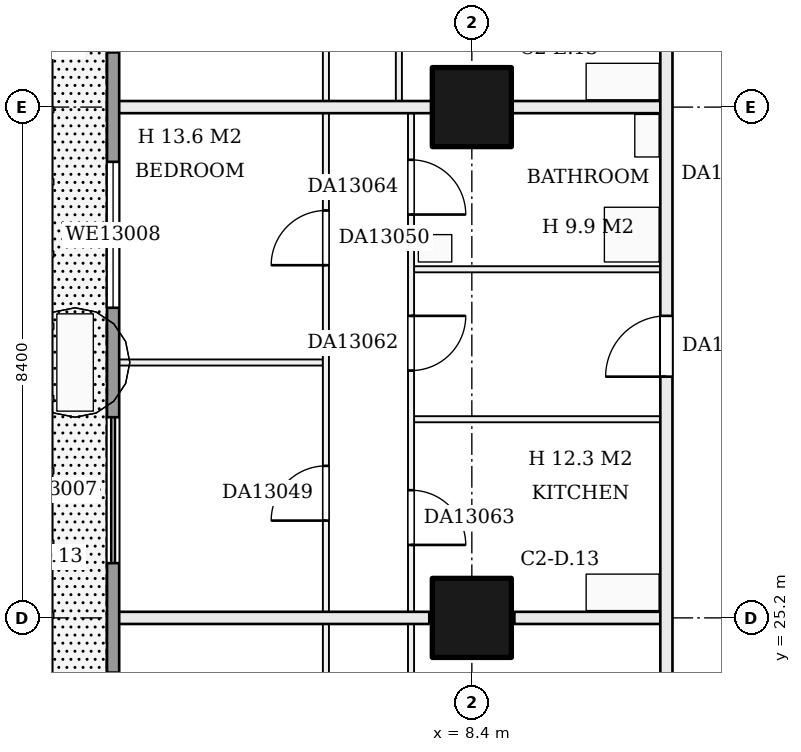
"""IFC4 building model, lengths in metres.
Left out: names, types, materials, properties, quantities, classifications, styles, units other than length and angle.
Written with IfcOpenShell. Run it as: python <this file> out.ifc"""

import sys

from ifc_helpers import new_model, si_unit, direction, frame, frame_2d, origin, origin_2d, place, context, subcontext, project, spatial, rectangle, extrude, element, fill, save


model = new_model("IFC4")
c1 = context("Model", 3, precision=1e-05, world=origin(), true_north=direction((0.0, 1.0)))
c2 = subcontext(c1, "Body", "Model", "MODEL_VIEW")
j1 = project(units=[si_unit("LENGTHUNIT", "METRE"), si_unit("PLANEANGLEUNIT", "RADIAN")], contexts=[c1])
p1 = place(None, origin())
s1 = spatial("IfcSite", under=j1, at=p1, CompositionType="ELEMENT")
p2 = place(p1, origin())
s2 = spatial("IfcBuilding", under=s1, at=p2, CompositionType="ELEMENT")
p3 = place(p2, frame((0.0, 0.0, 56.7)))
s3 = spatial("IfcBuildingStorey", under=s2, at=p3, CompositionType="ELEMENT", Elevation=56.7)
for number, where, z_axis, x_axis in (
    (1, (8.4, 25.2, 0.0), (0.0, 0.0, 1.0), (1.0, 0.0, 0.0)),
    (2, (8.4, 33.6, 0.0), (0.0, 0.0, 1.0), (1.0, 0.0, 0.0)),
):
    element("IfcColumn", number, at=place(p3, frame(where, z_axis=z_axis, x_axis=x_axis)), inside=s3, PredefinedType="COLUMN", context=c2, shape_type="SweptSolid", body=[
        extrude(rectangle(XDim=1.3, YDim=1.3, at=origin_2d()), origin(), (0.0, 0.0, 1.0), 3.22),
    ])
p4 = place(p3, frame((2.5, 25.2, 0.0), z_axis=(0.0, 0.0, 1.0), x_axis=(1.0, 0.0, 0.0)))
e3 = element("IfcWall", 3, at=p4, inside=s3, PredefinedType="PARTITIONING", context=c2, shape_type="SweptSolid", body=[
    extrude(rectangle(XDim=5.2, YDim=0.2, at=frame_2d((2.6, 0.0))), origin(), (0.0, 0.0, 1.0), 3.22),
])
p5 = place(p3, frame((9.1, 25.2, 0.0), z_axis=(0.0, 0.0, 1.0), x_axis=(1.0, 0.0, 0.0)))
e4 = element("IfcWall", 4, at=p5, inside=s3, PredefinedType="PARTITIONING", context=c2, shape_type="SweptSolid", body=[
    extrude(rectangle(XDim=2.4, YDim=0.2, at=frame_2d((1.2, 0.0))), origin(), (0.0, 0.0, 1.0), 3.22),
])
p6 = place(p3, frame((7.45, 28.467, 0.0), z_axis=(0.0, 0.0, 1.0), x_axis=(1.0, 0.0, 0.0)))
e5 = element("IfcWall", 5, at=p6, inside=s3, PredefinedType="PARTITIONING", context=c2, shape_type="SweptSolid", body=[
    extrude(rectangle(XDim=4.05, YDim=0.1, at=frame_2d((2.025, 0.0))), origin(), (0.0, 0.0, 1.0), 3.22),
])
p7 = place(p3, frame((2.5, 29.4, 0.0), z_axis=(0.0, 0.0, 1.0), x_axis=(1.0, 0.0, 0.0)))
e6 = element("IfcWall", 6, at=p7, inside=s3, PredefinedType="PARTITIONING", context=c2, shape_type="SweptSolid", body=[
    extrude(rectangle(XDim=3.45, YDim=0.1, at=frame_2d((1.725, 0.0))), origin(), (0.0, 0.0, 1.0), 3.22),
])
p8 = place(p3, frame((7.45, 30.933, 0.0), z_axis=(0.0, 0.0, 1.0), x_axis=(1.0, 0.0, 0.0)))
e7 = element("IfcWall", 7, at=p8, inside=s3, PredefinedType="PARTITIONING", context=c2, shape_type="SweptSolid", body=[
    extrude(rectangle(XDim=4.05, YDim=0.1, at=frame_2d((2.025, 0.0))), origin(), (0.0, 0.0, 1.0), 3.22),
])
p9 = place(p3, frame((2.5, 33.6, 0.0), z_axis=(0.0, 0.0, 1.0), x_axis=(1.0, 0.0, 0.0)))
e8 = element("IfcWall", 8, at=p9, inside=s3, PredefinedType="PARTITIONING", context=c2, shape_type="SweptSolid", body=[
    extrude(rectangle(XDim=9.0, YDim=0.2, at=frame_2d((4.5, 0.0))), origin(), (0.0, 0.0, 1.0), 3.22),
])
p10 = place(p3, frame((6.0, 12.7, 0.0), z_axis=(0.0, 0.0, 1.0), x_axis=(0.0, 1.0, 0.0)))
e9 = element("IfcWall", 9, at=p10, inside=s3, PredefinedType="PARTITIONING", context=c2, shape_type="SweptSolid", body=[
    extrude(rectangle(XDim=29.2, YDim=0.1, at=frame_2d((14.6, 0.0))), origin(), (0.0, 0.0, 1.0), 3.22),
])
p11 = place(p10, frame((3.7, 0.0, 0.0)))
e10 = element("IfcOpeningElement", 10, at=p11, cuts=e9, PredefinedType="OPENING", context=c2, shape_type="SweptSolid", body=[
    extrude(rectangle(XDim=0.9, YDim=2.1, at=frame_2d((0.45, 1.05))), frame((0.0, 0.06, 0.0), z_axis=(0.0, -1.0, 0.0), x_axis=(1.0, 0.0, 0.0)), (0.0, 0.0, 1.0), 0.12),
])
p12 = place(p10, frame((10.0, 0.0, 0.0)))
e11 = element("IfcOpeningElement", 11, at=p12, cuts=e9, PredefinedType="OPENING", context=c2, shape_type="SweptSolid", body=[
    extrude(rectangle(XDim=0.9, YDim=2.1, at=frame_2d((0.45, 1.05))), frame((0.0, 0.06, 0.0), z_axis=(0.0, -1.0, 0.0), x_axis=(1.0, 0.0, 0.0)), (0.0, 0.0, 1.0), 0.12),
])
p13 = place(p10, frame((14.1, 0.0, 0.0)))
e12 = element("IfcOpeningElement", 12, at=p13, cuts=e9, PredefinedType="OPENING", context=c2, shape_type="SweptSolid", body=[
    extrude(rectangle(XDim=0.9, YDim=2.1, at=frame_2d((0.45, 1.05))), frame((0.0, 0.06, 0.0), z_axis=(0.0, -1.0, 0.0), x_axis=(1.0, 0.0, 0.0)), (0.0, 0.0, 1.0), 0.12),
])
p14 = place(p10, frame((18.3, 0.0, 0.0)))
e13 = element("IfcOpeningElement", 13, at=p14, cuts=e9, PredefinedType="OPENING", context=c2, shape_type="SweptSolid", body=[
    extrude(rectangle(XDim=0.9, YDim=2.1, at=frame_2d((0.45, 1.05))), frame((0.0, 0.06, 0.0), z_axis=(0.0, -1.0, 0.0), x_axis=(1.0, 0.0, 0.0)), (0.0, 0.0, 1.0), 0.12),
])
p15 = place(p10, frame((22.5, 0.0, 0.0)))
e14 = element("IfcOpeningElement", 14, at=p15, cuts=e9, PredefinedType="OPENING", context=c2, shape_type="SweptSolid", body=[
    extrude(rectangle(XDim=0.9, YDim=2.1, at=frame_2d((0.45, 1.05))), frame((0.0, 0.06, 0.0), z_axis=(0.0, -1.0, 0.0), x_axis=(1.0, 0.0, 0.0)), (0.0, 0.0, 1.0), 0.12),
])
p16 = place(p10, frame((26.7, 0.0, 0.0)))
e15 = element("IfcOpeningElement", 15, at=p16, cuts=e9, PredefinedType="OPENING", context=c2, shape_type="SweptSolid", body=[
    extrude(rectangle(XDim=0.9, YDim=2.1, at=frame_2d((0.45, 1.05))), frame((0.0, 0.06, 0.0), z_axis=(0.0, -1.0, 0.0), x_axis=(1.0, 0.0, 0.0)), (0.0, 0.0, 1.0), 0.12),
])
p17 = place(p3, frame((7.2, 33.7, 0.0), z_axis=(0.0, 0.0, 1.0), x_axis=(0.0, 1.0, 0.0)))
e16 = element("IfcWall", 16, at=p17, inside=s3, PredefinedType="PARTITIONING", context=c2, shape_type="SweptSolid", body=[
    extrude(rectangle(XDim=8.2, YDim=0.1, at=frame_2d((4.1, 0.0))), origin(), (0.0, 0.0, 1.0), 3.22),
])
p18 = place(p17, frame((6.633, 0.0, 0.0)))
e17 = element("IfcOpeningElement", 17, at=p18, cuts=e16, PredefinedType="OPENING", context=c2, shape_type="SweptSolid", body=[
    extrude(rectangle(XDim=0.9, YDim=2.1, at=frame_2d((0.45, 1.05))), frame((0.0, 0.06, 0.0), z_axis=(0.0, -1.0, 0.0), x_axis=(1.0, 0.0, 0.0)), (0.0, 0.0, 1.0), 0.12),
])
p19 = place(p17, frame((1.1, 0.0, 0.0)))
e18 = element("IfcOpeningElement", 18, at=p19, cuts=e16, PredefinedType="OPENING", context=c2, shape_type="SweptSolid", body=[
    extrude(rectangle(XDim=0.9, YDim=2.1, at=frame_2d((0.45, 1.05))), frame((0.0, 0.06, 0.0), z_axis=(0.0, -1.0, 0.0), x_axis=(1.0, 0.0, 0.0)), (0.0, 0.0, 1.0), 0.12),
])
p20 = place(p17, frame((4.067, 0.0, 0.0)))
e19 = element("IfcOpeningElement", 19, at=p20, cuts=e16, PredefinedType="OPENING", context=c2, shape_type="SweptSolid", body=[
    extrude(rectangle(XDim=0.9, YDim=2.1, at=frame_2d((0.45, 1.05))), frame((0.0, 0.06, 0.0), z_axis=(0.0, -1.0, 0.0), x_axis=(1.0, 0.0, 0.0)), (0.0, 0.0, 1.0), 0.12),
])
p21 = place(p3, frame((7.4, 12.7, 0.0), z_axis=(0.0, 0.0, 1.0), x_axis=(0.0, 1.0, 0.0)))
e20 = element("IfcWall", 20, at=p21, inside=s3, PredefinedType="PARTITIONING", context=c2, shape_type="SweptSolid", body=[
    extrude(rectangle(XDim=20.8, YDim=0.1, at=frame_2d((10.4, 0.0))), origin(), (0.0, 0.0, 1.0), 3.22),
])
p22 = place(p21, frame((6.4, 0.0, 0.0)))
e21 = element("IfcOpeningElement", 21, at=p22, cuts=e20, PredefinedType="OPENING", context=c2, shape_type="SweptSolid", body=[
    extrude(rectangle(XDim=0.9, YDim=2.1, at=frame_2d((0.45, 1.05))), frame((0.0, 0.06, 0.0), z_axis=(0.0, -1.0, 0.0), x_axis=(1.0, 0.0, 0.0)), (0.0, 0.0, 1.0), 0.12),
])
p23 = place(p21, frame((0.4, 0.0, 0.0)))
e22 = element("IfcOpeningElement", 22, at=p23, cuts=e20, PredefinedType="OPENING", context=c2, shape_type="SweptSolid", body=[
    extrude(rectangle(XDim=0.9, YDim=2.1, at=frame_2d((0.45, 1.05))), frame((0.0, 0.06, 0.0), z_axis=(0.0, -1.0, 0.0), x_axis=(1.0, 0.0, 0.0)), (0.0, 0.0, 1.0), 0.12),
])
p24 = place(p21, frame((2.35, 0.0, 0.0)))
e23 = element("IfcOpeningElement", 23, at=p24, cuts=e20, PredefinedType="OPENING", context=c2, shape_type="SweptSolid", body=[
    extrude(rectangle(XDim=0.9, YDim=2.1, at=frame_2d((0.45, 1.05))), frame((0.0, 0.06, 0.0), z_axis=(0.0, -1.0, 0.0), x_axis=(1.0, 0.0, 0.0)), (0.0, 0.0, 1.0), 0.12),
])
p25 = place(p21, frame((10.05, 0.0, 0.0)))
e24 = element("IfcOpeningElement", 24, at=p25, cuts=e20, PredefinedType="OPENING", context=c2, shape_type="SweptSolid", body=[
    extrude(rectangle(XDim=0.9, YDim=2.1, at=frame_2d((0.45, 1.05))), frame((0.0, 0.06, 0.0), z_axis=(0.0, -1.0, 0.0), x_axis=(1.0, 0.0, 0.0)), (0.0, 0.0, 1.0), 0.12),
])
p26 = place(p21, frame((16.567, 0.0, 0.0)))
e25 = element("IfcOpeningElement", 25, at=p26, cuts=e20, PredefinedType="OPENING", context=c2, shape_type="SweptSolid", body=[
    extrude(rectangle(XDim=0.9, YDim=2.1, at=frame_2d((0.45, 1.05))), frame((0.0, 0.06, 0.0), z_axis=(0.0, -1.0, 0.0), x_axis=(1.0, 0.0, 0.0)), (0.0, 0.0, 1.0), 0.12),
])
p27 = place(p21, frame((13.7, 0.0, 0.0)))
e26 = element("IfcOpeningElement", 26, at=p27, cuts=e20, PredefinedType="OPENING", context=c2, shape_type="SweptSolid", body=[
    extrude(rectangle(XDim=0.9, YDim=2.1, at=frame_2d((0.45, 1.05))), frame((0.0, 0.06, 0.0), z_axis=(0.0, -1.0, 0.0), x_axis=(1.0, 0.0, 0.0)), (0.0, 0.0, 1.0), 0.12),
])
p28 = place(p21, frame((19.133, 0.0, 0.0)))
e27 = element("IfcOpeningElement", 27, at=p28, cuts=e20, PredefinedType="OPENING", context=c2, shape_type="SweptSolid", body=[
    extrude(rectangle(XDim=0.9, YDim=2.1, at=frame_2d((0.45, 1.05))), frame((0.0, 0.06, 0.0), z_axis=(0.0, -1.0, 0.0), x_axis=(1.0, 0.0, 0.0)), (0.0, 0.0, 1.0), 0.12),
])
p29 = place(p3, frame((11.6, 11.7, 0.0), z_axis=(0.0, 0.0, 1.0), x_axis=(0.0, 1.0, 0.0)))
e28 = element("IfcWall", 28, at=p29, inside=s3, PredefinedType="PARTITIONING", context=c2, shape_type="SweptSolid", body=[
    extrude(rectangle(XDim=30.3, YDim=0.2, at=frame_2d((15.15, 0.0))), origin(), (0.0, 0.0, 1.0), 3.22),
])
p30 = place(p29, frame((7.3, 0.0, 0.0)))
e29 = element("IfcOpeningElement", 29, at=p30, cuts=e28, PredefinedType="OPENING", context=c2, shape_type="SweptSolid", body=[
    extrude(rectangle(XDim=1.0, YDim=2.1, at=frame_2d((0.5, 1.05))), frame((0.0, 0.11, 0.0), z_axis=(0.0, -1.0, 0.0), x_axis=(1.0, 0.0, 0.0)), (0.0, 0.0, 1.0), 0.22),
])
p31 = place(p29, frame((17.467, 0.0, 0.0)))
e30 = element("IfcOpeningElement", 30, at=p31, cuts=e28, PredefinedType="OPENING", context=c2, shape_type="SweptSolid", body=[
    extrude(rectangle(XDim=1.0, YDim=2.1, at=frame_2d((0.5, 1.05))), frame((0.0, 0.11, 0.0), z_axis=(0.0, -1.0, 0.0), x_axis=(1.0, 0.0, 0.0)), (0.0, 0.0, 1.0), 0.22),
])
p32 = place(p29, frame((28.533, 0.0, 0.0)))
e31 = element("IfcOpeningElement", 31, at=p32, cuts=e28, PredefinedType="OPENING", context=c2, shape_type="SweptSolid", body=[
    extrude(rectangle(XDim=1.0, YDim=2.1, at=frame_2d((0.5, 1.05))), frame((0.0, 0.11, 0.0), z_axis=(0.0, -1.0, 0.0), x_axis=(1.0, 0.0, 0.0)), (0.0, 0.0, 1.0), 0.22),
])
p33 = place(p3, frame((2.5, 53.8, 0.0), z_axis=(0.0, 0.0, 1.0), x_axis=(0.0, -1.0, 0.0)))
e32 = element("IfcWall", 32, at=p33, inside=s3, PredefinedType="SOLIDWALL", context=c2, shape_type="SweptSolid", body=[
    extrude(rectangle(XDim=48.8, YDim=0.2, at=frame_2d((24.4, 0.0))), origin(), (0.0, 0.0, 1.0), 3.22),
])
p34 = place(p33, frame((46.1, 0.0, 0.0)))
e33 = element("IfcOpeningElement", 33, at=p34, cuts=e32, PredefinedType="OPENING", context=c2, shape_type="SweptSolid", body=[
    extrude(rectangle(XDim=2.4, YDim=2.2, at=frame_2d((1.2, 1.1))), frame((0.0, 0.11, 0.0), z_axis=(0.0, -1.0, 0.0), x_axis=(1.0, 0.0, 0.0)), (0.0, 0.0, 1.0), 0.22),
])
p35 = place(p33, frame((42.1, 0.0, 0.0)))
e34 = element("IfcOpeningElement", 34, at=p35, cuts=e32, PredefinedType="OPENING", context=c2, shape_type="SweptSolid", body=[
    extrude(rectangle(XDim=2.4, YDim=2.2, at=frame_2d((1.2, 1.1))), frame((0.0, 0.11, 0.0), z_axis=(0.0, -1.0, 0.0), x_axis=(1.0, 0.0, 0.0)), (0.0, 0.0, 1.0), 0.22),
])
p36 = place(p33, frame((37.9, 0.0, 0.0)))
e35 = element("IfcOpeningElement", 35, at=p36, cuts=e32, PredefinedType="OPENING", context=c2, shape_type="SweptSolid", body=[
    extrude(rectangle(XDim=2.4, YDim=2.2, at=frame_2d((1.2, 1.1))), frame((0.0, 0.11, 0.0), z_axis=(0.0, -1.0, 0.0), x_axis=(1.0, 0.0, 0.0)), (0.0, 0.0, 1.0), 0.22),
])
p37 = place(p33, frame((33.7, 0.0, 0.0)))
e36 = element("IfcOpeningElement", 36, at=p37, cuts=e32, PredefinedType="OPENING", context=c2, shape_type="SweptSolid", body=[
    extrude(rectangle(XDim=2.4, YDim=2.2, at=frame_2d((1.2, 1.1))), frame((0.0, 0.11, 0.0), z_axis=(0.0, -1.0, 0.0), x_axis=(1.0, 0.0, 0.0)), (0.0, 0.0, 1.0), 0.22),
])
p38 = place(p33, frame((29.5, 0.0, 0.9)))
e37 = element("IfcOpeningElement", 37, at=p38, cuts=e32, PredefinedType="OPENING", context=c2, shape_type="SweptSolid", body=[
    extrude(rectangle(XDim=2.4, YDim=1.5, at=frame_2d((1.2, 0.75))), frame((0.0, 0.11, 0.0), z_axis=(0.0, -1.0, 0.0), x_axis=(1.0, 0.0, 0.0)), (0.0, 0.0, 1.0), 0.22),
])
p39 = place(p33, frame((25.3, 0.0, 0.0)))
e38 = element("IfcOpeningElement", 38, at=p39, cuts=e32, PredefinedType="OPENING", context=c2, shape_type="SweptSolid", body=[
    extrude(rectangle(XDim=2.4, YDim=2.2, at=frame_2d((1.2, 1.1))), frame((0.0, 0.11, 0.0), z_axis=(0.0, -1.0, 0.0), x_axis=(1.0, 0.0, 0.0)), (0.0, 0.0, 1.0), 0.22),
])
p40 = place(p33, frame((21.1, 0.0, 0.9)))
e39 = element("IfcOpeningElement", 39, at=p40, cuts=e32, PredefinedType="OPENING", context=c2, shape_type="SweptSolid", body=[
    extrude(rectangle(XDim=2.4, YDim=1.5, at=frame_2d((1.2, 0.75))), frame((0.0, 0.11, 0.0), z_axis=(0.0, -1.0, 0.0), x_axis=(1.0, 0.0, 0.0)), (0.0, 0.0, 1.0), 0.22),
])
p41 = place(p33, frame((16.9, 0.0, 0.0)))
e40 = element("IfcOpeningElement", 40, at=p41, cuts=e32, PredefinedType="OPENING", context=c2, shape_type="SweptSolid", body=[
    extrude(rectangle(XDim=2.4, YDim=2.2, at=frame_2d((1.2, 1.1))), frame((0.0, 0.11, 0.0), z_axis=(0.0, -1.0, 0.0), x_axis=(1.0, 0.0, 0.0)), (0.0, 0.0, 1.0), 0.22),
])
p42 = place(p33, frame((12.7, 0.0, 0.9)))
e41 = element("IfcOpeningElement", 41, at=p42, cuts=e32, PredefinedType="OPENING", context=c2, shape_type="SweptSolid", body=[
    extrude(rectangle(XDim=2.4, YDim=1.5, at=frame_2d((1.2, 0.75))), frame((0.0, 0.11, 0.0), z_axis=(0.0, -1.0, 0.0), x_axis=(1.0, 0.0, 0.0)), (0.0, 0.0, 1.0), 0.22),
])
p43 = place(p33, frame((8.5, 0.0, 0.9)))
e42 = element("IfcOpeningElement", 42, at=p43, cuts=e32, PredefinedType="OPENING", context=c2, shape_type="SweptSolid", body=[
    extrude(rectangle(XDim=2.4, YDim=1.5, at=frame_2d((1.2, 0.75))), frame((0.0, 0.11, 0.0), z_axis=(0.0, -1.0, 0.0), x_axis=(1.0, 0.0, 0.0)), (0.0, 0.0, 1.0), 0.22),
])
p44 = place(p33, frame((4.3, 0.0, 0.0)))
e43 = element("IfcOpeningElement", 43, at=p44, cuts=e32, PredefinedType="OPENING", context=c2, shape_type="SweptSolid", body=[
    extrude(rectangle(XDim=2.4, YDim=2.2, at=frame_2d((1.2, 1.1))), frame((0.0, 0.11, 0.0), z_axis=(0.0, -1.0, 0.0), x_axis=(1.0, 0.0, 0.0)), (0.0, 0.0, 1.0), 0.22),
])
p45 = place(p33, frame((0.3, 0.0, 0.9)))
e44 = element("IfcOpeningElement", 44, at=p45, cuts=e32, PredefinedType="OPENING", context=c2, shape_type="SweptSolid", body=[
    extrude(rectangle(XDim=2.4, YDim=1.5, at=frame_2d((1.2, 0.75))), frame((0.0, 0.11, 0.0), z_axis=(0.0, -1.0, 0.0), x_axis=(1.0, 0.0, 0.0)), (0.0, 0.0, 1.0), 0.22),
])
p46 = place(p13, origin())
e45 = element("IfcDoor", 45, at=p46, inside=s3, OperationType="SINGLE_SWING_LEFT", PredefinedType="DOOR", context=c2, shape_type="SweptSolid", body=[
    extrude(rectangle(XDim=0.9, YDim=2.1, at=frame_2d((0.45, 1.05))), frame((0.0, 0.025, 0.0), z_axis=(0.0, -1.0, 0.0), x_axis=(1.0, 0.0, 0.0)), (0.0, 0.0, 1.0), 0.05),
])
fill(e12, e45)
p47 = place(p14, origin())
e46 = element("IfcDoor", 46, at=p47, inside=s3, OperationType="SINGLE_SWING_LEFT", PredefinedType="DOOR", context=c2, shape_type="SweptSolid", body=[
    extrude(rectangle(XDim=0.9, YDim=2.1, at=frame_2d((0.45, 1.05))), frame((0.0, 0.025, 0.0), z_axis=(0.0, -1.0, 0.0), x_axis=(1.0, 0.0, 0.0)), (0.0, 0.0, 1.0), 0.05),
])
fill(e13, e46)
p48 = place(p26, frame((0.9, 0.0, 0.0), z_axis=(0.0, 0.0, 1.0), x_axis=(-1.0, 0.0, 0.0)))
e47 = element("IfcDoor", 47, at=p48, inside=s3, OperationType="SINGLE_SWING_LEFT", PredefinedType="DOOR", context=c2, shape_type="SweptSolid", body=[
    extrude(rectangle(XDim=0.9, YDim=2.1, at=frame_2d((0.45, 1.05))), frame((0.0, 0.025, 0.0), z_axis=(0.0, -1.0, 0.0), x_axis=(1.0, 0.0, 0.0)), (0.0, 0.0, 1.0), 0.05),
])
fill(e25, e47)
p49 = place(p27, frame((0.9, 0.0, 0.0), z_axis=(0.0, 0.0, 1.0), x_axis=(-1.0, 0.0, 0.0)))
e48 = element("IfcDoor", 48, at=p49, inside=s3, OperationType="SINGLE_SWING_RIGHT", PredefinedType="DOOR", context=c2, shape_type="SweptSolid", body=[
    extrude(rectangle(XDim=0.9, YDim=2.1, at=frame_2d((0.45, 1.05))), frame((0.0, 0.025, 0.0), z_axis=(0.0, -1.0, 0.0), x_axis=(1.0, 0.0, 0.0)), (0.0, 0.0, 1.0), 0.05),
])
fill(e26, e48)
p50 = place(p28, frame((0.9, 0.0, 0.0), z_axis=(0.0, 0.0, 1.0), x_axis=(-1.0, 0.0, 0.0)))
e49 = element("IfcDoor", 49, at=p50, inside=s3, OperationType="SINGLE_SWING_RIGHT", PredefinedType="DOOR", context=c2, shape_type="SweptSolid", body=[
    extrude(rectangle(XDim=0.9, YDim=2.1, at=frame_2d((0.45, 1.05))), frame((0.0, 0.025, 0.0), z_axis=(0.0, -1.0, 0.0), x_axis=(1.0, 0.0, 0.0)), (0.0, 0.0, 1.0), 0.05),
])
fill(e27, e49)
p51 = place(p31, origin())
e50 = element("IfcDoor", 50, at=p51, inside=s3, OperationType="SINGLE_SWING_LEFT", PredefinedType="DOOR", context=c2, shape_type="SweptSolid", body=[
    extrude(rectangle(XDim=1.0, YDim=2.1, at=frame_2d((0.5, 1.05))), frame((0.0, 0.025, 0.0), z_axis=(0.0, -1.0, 0.0), x_axis=(1.0, 0.0, 0.0)), (0.0, 0.0, 1.0), 0.05),
])
fill(e30, e50)
p52 = place(p39, origin())
e51 = element("IfcDoor", 51, at=p52, inside=s3, OperationType="DOUBLE_DOOR_SLIDING", PredefinedType="DOOR", context=c2, shape_type="SweptSolid", body=[
    extrude(rectangle(XDim=2.4, YDim=2.2, at=frame_2d((1.2, 1.1))), frame((0.0, 0.025, 0.0), z_axis=(0.0, -1.0, 0.0), x_axis=(1.0, 0.0, 0.0)), (0.0, 0.0, 1.0), 0.05),
])
fill(e38, e51)
p53 = place(p40, origin())
e52 = element("IfcWindow", 52, at=p53, inside=s3, PartitioningType="SINGLE_PANEL", PredefinedType="WINDOW", context=c2, shape_type="SweptSolid", body=[
    extrude(rectangle(XDim=2.4, YDim=1.5, at=frame_2d((1.2, 0.75))), frame((0.0, 0.03, 0.0), z_axis=(0.0, -1.0, 0.0), x_axis=(1.0, 0.0, 0.0)), (0.0, 0.0, 1.0), 0.06),
])
fill(e39, e52)
save(model, sys.argv[1])
